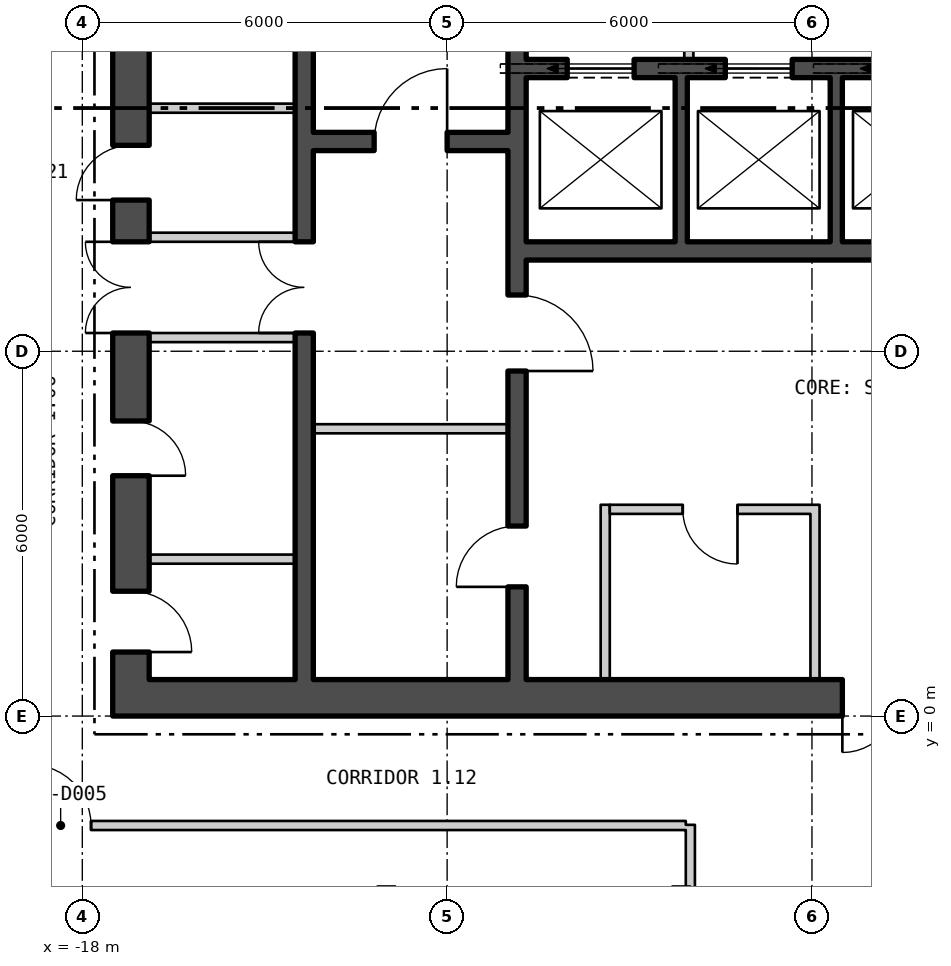
"""IFC4 building model, lengths in metres.
Left out: names, types, materials, properties, quantities, classifications, styles, units other than length and angle.
Written with IfcOpenShell. Run it as: python <this file> out.ifc"""

import sys

from ifc_helpers import new_model, si_unit, direction, frame, frame_2d, origin, origin_2d, place, context, subcontext, project, spatial, polyline, rectangle, i_section, outline, extrude, element, fill, save


model = new_model("IFC4")
c1 = context("Model", 3, precision=1e-05, world=origin(), true_north=direction((0.0, 1.0)))
c2 = subcontext(c1, "Body", "Model", "MODEL_VIEW")
j1 = project(units=[si_unit("LENGTHUNIT", "METRE"), si_unit("PLANEANGLEUNIT", "RADIAN")], contexts=[c1])
p1 = place(None, origin())
s1 = spatial("IfcSite", under=j1, at=p1, CompositionType="ELEMENT")
p2 = place(p1, origin())
s2 = spatial("IfcBuilding", under=s1, at=p2, CompositionType="ELEMENT")
p3 = place(p2, frame((0.0, 0.0, 28.8)))
s3 = spatial("IfcBuildingStorey", under=s2, at=p3, CompositionType="ELEMENT", Elevation=28.8)
for number, where, z_axis, x_axis in (
    (1, (-8.15, -3.2, 0.0), (0.0, 0.0, 1.0), (1.0, 0.0, 0.0)),
    (2, (-13.0, -3.2, 0.0), (0.0, 0.0, 1.0), (1.0, 0.0, 0.0)),
):
    element("IfcColumn", number, at=place(p3, frame(where, z_axis=z_axis, x_axis=x_axis)), inside=s3, PredefinedType="COLUMN", context=c2, shape_type="SweptSolid", body=[
        extrude(i_section(OverallWidth=0.303, OverallDepth=0.814, WebThickness=0.021, FlangeThickness=0.04, at=origin_2d()), origin(), (0.0, 0.0, 1.0), 4.5),
    ])
p4 = place(p3, frame((-28.74, 9.808, -0.23), z_axis=(0.0, 0.0, 1.0), x_axis=(0.499999764979, -0.866025539474, 0.0)))
e3 = element("IfcWall", 3, at=p4, inside=s3, PredefinedType="SOLIDWALL", context=c2, shape_type="SweptSolid", body=[
    extrude(outline(polyline([(-0.13, -0.225), (45.87, -0.225), (45.61, 0.225), (0.13, 0.225), (-0.13, -0.225)])), origin(), (0.0, 0.0, 1.0), 4.55),
])
p5 = place(p4, frame((1.724, 0.0, 0.23)))
e4 = element("IfcOpeningElement", 4, at=p5, cuts=e3, PredefinedType="OPENING", context=c2, shape_type="SweptSolid", body=[
    extrude(rectangle(XDim=1.8, YDim=2.4, at=frame_2d((0.9, 1.2))), frame((0.0, 0.235, 0.0), z_axis=(0.0, -1.0, 0.0), x_axis=(1.0, 0.0, 0.0)), (0.0, 0.0, 1.0), 0.47),
])
p6 = place(p4, frame((5.893, 0.0, 1.13)))
e5 = element("IfcOpeningElement", 5, at=p6, cuts=e3, PredefinedType="OPENING", context=c2, shape_type="SweptSolid", body=[
    extrude(rectangle(XDim=2.4, YDim=2.6, at=frame_2d((1.2, 1.3))), frame((0.0, 0.235, 0.0), z_axis=(0.0, -1.0, 0.0), x_axis=(1.0, 0.0, 0.0)), (0.0, 0.0, 1.0), 0.47),
])
p7 = place(p4, frame((10.401, 0.0, 1.13)))
e6 = element("IfcOpeningElement", 6, at=p7, cuts=e3, PredefinedType="OPENING", context=c2, shape_type="SweptSolid", body=[
    extrude(rectangle(XDim=2.4, YDim=2.6, at=frame_2d((1.2, 1.3))), frame((0.0, 0.235, 0.0), z_axis=(0.0, -1.0, 0.0), x_axis=(1.0, 0.0, 0.0)), (0.0, 0.0, 1.0), 0.47),
])
p8 = place(p4, frame((14.909, 0.0, 1.13)))
e7 = element("IfcOpeningElement", 7, at=p8, cuts=e3, PredefinedType="OPENING", context=c2, shape_type="SweptSolid", body=[
    extrude(rectangle(XDim=2.4, YDim=2.6, at=frame_2d((1.2, 1.3))), frame((0.0, 0.235, 0.0), z_axis=(0.0, -1.0, 0.0), x_axis=(1.0, 0.0, 0.0)), (0.0, 0.0, 1.0), 0.47),
])
p9 = place(p4, frame((19.416, 0.0, 1.13)))
e8 = element("IfcOpeningElement", 8, at=p9, cuts=e3, PredefinedType="OPENING", context=c2, shape_type="SweptSolid", body=[
    extrude(rectangle(XDim=2.4, YDim=2.6, at=frame_2d((1.2, 1.3))), frame((0.0, 0.235, 0.0), z_axis=(0.0, -1.0, 0.0), x_axis=(1.0, 0.0, 0.0)), (0.0, 0.0, 1.0), 0.47),
])
p10 = place(p4, frame((23.924, 0.0, 1.13)))
e9 = element("IfcOpeningElement", 9, at=p10, cuts=e3, PredefinedType="OPENING", context=c2, shape_type="SweptSolid", body=[
    extrude(rectangle(XDim=2.4, YDim=2.6, at=frame_2d((1.2, 1.3))), frame((0.0, 0.235, 0.0), z_axis=(0.0, -1.0, 0.0), x_axis=(1.0, 0.0, 0.0)), (0.0, 0.0, 1.0), 0.47),
])
p11 = place(p4, frame((28.431, 0.0, 1.13)))
e10 = element("IfcOpeningElement", 10, at=p11, cuts=e3, PredefinedType="OPENING", context=c2, shape_type="SweptSolid", body=[
    extrude(rectangle(XDim=2.4, YDim=2.6, at=frame_2d((1.2, 1.3))), frame((0.0, 0.235, 0.0), z_axis=(0.0, -1.0, 0.0), x_axis=(1.0, 0.0, 0.0)), (0.0, 0.0, 1.0), 0.47),
])
p12 = place(p4, frame((33.239, 0.0, 0.23)))
e11 = element("IfcOpeningElement", 11, at=p12, cuts=e3, PredefinedType="OPENING", context=c2, shape_type="SweptSolid", body=[
    extrude(rectangle(XDim=1.8, YDim=2.4, at=frame_2d((0.9, 1.2))), frame((0.0, 0.235, 0.0), z_axis=(0.0, -1.0, 0.0), x_axis=(1.0, 0.0, 0.0)), (0.0, 0.0, 1.0), 0.47),
])
p13 = place(p4, frame((37.447, 0.0, 1.13)))
e12 = element("IfcOpeningElement", 12, at=p13, cuts=e3, PredefinedType="OPENING", context=c2, shape_type="SweptSolid", body=[
    extrude(rectangle(XDim=2.4, YDim=2.6, at=frame_2d((1.2, 1.3))), frame((0.0, 0.235, 0.0), z_axis=(0.0, -1.0, 0.0), x_axis=(1.0, 0.0, 0.0)), (0.0, 0.0, 1.0), 0.47),
])
p14 = place(p4, frame((41.916, 0.0, 1.13)))
e13 = element("IfcOpeningElement", 13, at=p14, cuts=e3, PredefinedType="OPENING", context=c2, shape_type="SweptSolid", body=[
    extrude(rectangle(XDim=2.4, YDim=2.6, at=frame_2d((1.2, 1.3))), frame((0.0, 0.235, 0.0), z_axis=(0.0, -1.0, 0.0), x_axis=(1.0, 0.0, 0.0)), (0.0, 0.0, 1.0), 0.47),
])
p15 = place(p3, frame((-17.5, 0.3, 0.0), z_axis=(0.0, 0.0, 1.0), x_axis=(1.0, 0.0, 0.0)))
e14 = element("IfcWall", 14, at=p15, inside=s3, PredefinedType="SHEAR", context=c2, shape_type="SweptSolid", body=[
    extrude(rectangle(XDim=35.0, YDim=0.6, at=frame_2d((17.5, 0.0))), origin(), (0.0, 0.0, 1.0), 4.3),
])
p16 = place(p15, frame((12.0, 0.0, 0.0)))
e15 = element("IfcOpeningElement", 15, at=p16, cuts=e14, PredefinedType="OPENING", context=c2, shape_type="SweptSolid", body=[
    extrude(rectangle(XDim=1.8, YDim=2.4, at=frame_2d((0.9, 1.2))), frame((0.0, 0.31, 0.0), z_axis=(0.0, -1.0, 0.0), x_axis=(1.0, 0.0, 0.0)), (0.0, 0.0, 1.0), 0.62),
])
p17 = place(p15, frame((22.0, 0.0, 0.0)))
e16 = element("IfcOpeningElement", 16, at=p17, cuts=e14, PredefinedType="OPENING", context=c2, shape_type="SweptSolid", body=[
    extrude(rectangle(XDim=1.8, YDim=2.4, at=frame_2d((0.9, 1.2))), frame((0.0, 0.31, 0.0), z_axis=(0.0, -1.0, 0.0), x_axis=(1.0, 0.0, 0.0)), (0.0, 0.0, 1.0), 0.62),
])
p18 = place(p3, frame((-17.2, 0.6, 0.0), z_axis=(0.0, 0.0, 1.0), x_axis=(0.0, 1.0, 0.0)))
e17 = element("IfcWall", 17, at=p18, inside=s3, PredefinedType="SHEAR", context=c2, shape_type="SweptSolid", body=[
    extrude(rectangle(XDim=16.8, YDim=0.6, at=frame_2d((8.4, 0.0))), origin(), (0.0, 0.0, 1.0), 4.3),
])
p19 = place(p18, frame((5.7, 0.0, 0.0)))
e18 = element("IfcOpeningElement", 18, at=p19, cuts=e17, PredefinedType="OPENING", context=c2, shape_type="SweptSolid", body=[
    extrude(rectangle(XDim=1.5, YDim=2.1, at=frame_2d((0.75, 1.05))), frame((0.0, 0.31, 0.0), z_axis=(0.0, -1.0, 0.0), x_axis=(1.0, 0.0, 0.0)), (0.0, 0.0, 1.0), 0.62),
])
p20 = place(p18, frame((0.453, 0.0, 0.0)))
e19 = element("IfcOpeningElement", 19, at=p20, cuts=e17, PredefinedType="OPENING", context=c2, shape_type="SweptSolid", body=[
    extrude(rectangle(XDim=1.0, YDim=2.1, at=frame_2d((0.5, 1.05))), frame((0.0, 0.31, 0.0), z_axis=(0.0, -1.0, 0.0), x_axis=(1.0, 0.0, 0.0)), (0.0, 0.0, 1.0), 0.62),
])
p21 = place(p18, frame((3.353, 0.0, 0.0)))
e20 = element("IfcOpeningElement", 20, at=p21, cuts=e17, PredefinedType="OPENING", context=c2, shape_type="SweptSolid", body=[
    extrude(rectangle(XDim=0.9, YDim=2.1, at=frame_2d((0.45, 1.05))), frame((0.0, 0.31, 0.0), z_axis=(0.0, -1.0, 0.0), x_axis=(1.0, 0.0, 0.0)), (0.0, 0.0, 1.0), 0.62),
])
p22 = place(p18, frame((7.886, 0.0, 0.0)))
e21 = element("IfcOpeningElement", 21, at=p22, cuts=e17, PredefinedType="OPENING", context=c2, shape_type="SweptSolid", body=[
    extrude(rectangle(XDim=0.9, YDim=2.1, at=frame_2d((0.45, 1.05))), frame((0.0, 0.31, 0.0), z_axis=(0.0, -1.0, 0.0), x_axis=(1.0, 0.0, 0.0)), (0.0, 0.0, 1.0), 0.62),
])
p23 = place(p18, frame((12.686, 0.0, 0.0)))
e22 = element("IfcOpeningElement", 22, at=p23, cuts=e17, PredefinedType="OPENING", context=c2, shape_type="SweptSolid", body=[
    extrude(rectangle(XDim=0.9, YDim=2.1, at=frame_2d((0.45, 1.05))), frame((0.0, 0.31, 0.0), z_axis=(0.0, -1.0, 0.0), x_axis=(1.0, 0.0, 0.0)), (0.0, 0.0, 1.0), 0.62),
])
p24 = place(p3, frame((-10.85, 0.6, 0.0), z_axis=(0.0, 0.0, 1.0), x_axis=(0.0, 1.0, 0.0)))
e23 = element("IfcWall", 23, at=p24, inside=s3, PredefinedType="SHEAR", context=c2, shape_type="SweptSolid", body=[
    extrude(rectangle(XDim=16.8, YDim=0.3, at=frame_2d((8.4, 0.0))), origin(), (0.0, 0.0, 1.0), 4.3),
])
p25 = place(p24, frame((5.075, 0.0, 0.0)))
e24 = element("IfcOpeningElement", 24, at=p25, cuts=e23, PredefinedType="OPENING", context=c2, shape_type="SweptSolid", body=[
    extrude(rectangle(XDim=1.25, YDim=2.1, at=frame_2d((0.625, 1.05))), frame((0.0, 0.16, 0.0), z_axis=(0.0, -1.0, 0.0), x_axis=(1.0, 0.0, 0.0)), (0.0, 0.0, 1.0), 0.32),
])
p26 = place(p24, frame((1.525, 0.0, 0.0)))
e25 = element("IfcOpeningElement", 25, at=p26, cuts=e23, PredefinedType="OPENING", context=c2, shape_type="SweptSolid", body=[
    extrude(rectangle(XDim=1.0, YDim=2.1, at=frame_2d((0.5, 1.05))), frame((0.0, 0.16, 0.0), z_axis=(0.0, -1.0, 0.0), x_axis=(1.0, 0.0, 0.0)), (0.0, 0.0, 1.0), 0.32),
])
p27 = place(p3, frame((-14.35, 0.6, 0.0), z_axis=(0.0, 0.0, 1.0), x_axis=(0.0, 1.0, 0.0)))
e26 = element("IfcWall", 26, at=p27, inside=s3, PredefinedType="SHEAR", context=c2, shape_type="SweptSolid", body=[
    extrude(rectangle(XDim=16.8, YDim=0.3, at=frame_2d((8.4, 0.0))), origin(), (0.0, 0.0, 1.0), 4.3),
])
p28 = place(p27, frame((5.7, 0.0, 0.0)))
e27 = element("IfcOpeningElement", 27, at=p28, cuts=e26, PredefinedType="OPENING", context=c2, shape_type="SweptSolid", body=[
    extrude(rectangle(XDim=1.5, YDim=2.1, at=frame_2d((0.75, 1.05))), frame((0.0, 0.16, 0.0), z_axis=(0.0, -1.0, 0.0), x_axis=(1.0, 0.0, 0.0)), (0.0, 0.0, 1.0), 0.32),
])
p29 = place(p3, frame((-14.2, 9.45, 0.0), z_axis=(0.0, 0.0, 1.0), x_axis=(1.0, 0.0, 0.0)))
e28 = element("IfcWall", 28, at=p29, inside=s3, PredefinedType="SHEAR", context=c2, shape_type="SweptSolid", body=[
    extrude(rectangle(XDim=3.2, YDim=0.3, at=frame_2d((1.6, 0.0))), origin(), (0.0, 0.0, 1.0), 4.3),
])
p30 = place(p29, frame((1.0, 0.0, 0.0)))
e29 = element("IfcOpeningElement", 29, at=p30, cuts=e28, PredefinedType="OPENING", context=c2, shape_type="SweptSolid", body=[
    extrude(rectangle(XDim=1.2, YDim=2.1, at=frame_2d((0.6, 1.05))), frame((0.0, 0.16, 0.0), z_axis=(0.0, -1.0, 0.0), x_axis=(1.0, 0.0, 0.0)), (0.0, 0.0, 1.0), 0.32),
])
p31 = place(p3, frame((-10.7, 10.65, 0.0), z_axis=(0.0, 0.0, 1.0), x_axis=(1.0, 0.0, 0.0)))
e30 = element("IfcWall", 30, at=p31, inside=s3, PredefinedType="SHEAR", context=c2, shape_type="SweptSolid", body=[
    extrude(rectangle(XDim=10.3, YDim=0.3, at=frame_2d((5.15, 0.0))), origin(), (0.0, 0.0, 1.0), 4.3),
])
p32 = place(p31, frame((0.675, 0.0, 0.0)))
e31 = element("IfcOpeningElement", 31, at=p32, cuts=e30, PredefinedType="OPENING", context=c2, shape_type="SweptSolid", body=[
    extrude(rectangle(XDim=1.1, YDim=2.1, at=frame_2d((0.55, 1.05))), frame((0.0, 0.16, 0.0), z_axis=(0.0, -1.0, 0.0), x_axis=(1.0, 0.0, 0.0)), (0.0, 0.0, 1.0), 0.32),
])
p33 = place(p31, frame((3.275, 0.0, 0.0)))
e32 = element("IfcOpeningElement", 32, at=p33, cuts=e30, PredefinedType="OPENING", context=c2, shape_type="SweptSolid", body=[
    extrude(rectangle(XDim=1.1, YDim=2.1, at=frame_2d((0.55, 1.05))), frame((0.0, 0.16, 0.0), z_axis=(0.0, -1.0, 0.0), x_axis=(1.0, 0.0, 0.0)), (0.0, 0.0, 1.0), 0.32),
])
p34 = place(p31, frame((5.825, 0.0, 0.0)))
e33 = element("IfcOpeningElement", 33, at=p34, cuts=e30, PredefinedType="OPENING", context=c2, shape_type="SweptSolid", body=[
    extrude(rectangle(XDim=1.1, YDim=2.1, at=frame_2d((0.55, 1.05))), frame((0.0, 0.16, 0.0), z_axis=(0.0, -1.0, 0.0), x_axis=(1.0, 0.0, 0.0)), (0.0, 0.0, 1.0), 0.32),
])
p35 = place(p31, frame((8.375, 0.0, 0.0)))
e34 = element("IfcOpeningElement", 34, at=p35, cuts=e30, PredefinedType="OPENING", context=c2, shape_type="SweptSolid", body=[
    extrude(rectangle(XDim=1.1, YDim=2.1, at=frame_2d((0.55, 1.05))), frame((0.0, 0.16, 0.0), z_axis=(0.0, -1.0, 0.0), x_axis=(1.0, 0.0, 0.0)), (0.0, 0.0, 1.0), 0.32),
])
p36 = place(p3, frame((-10.7, 7.65, 0.0), z_axis=(0.0, 0.0, 1.0), x_axis=(1.0, 0.0, 0.0)))
e35 = element("IfcWall", 35, at=p36, inside=s3, PredefinedType="SHEAR", context=c2, shape_type="SweptSolid", body=[
    extrude(rectangle(XDim=10.3, YDim=0.3, at=frame_2d((5.15, 0.0))), origin(), (0.0, 0.0, 1.0), 4.3),
])
for number, where, z_axis, x_axis in (
    (36, (-8.15, 7.8, 0.0), (0.0, 0.0, 1.0), (0.0, 1.0, 0.0)),
    (37, (-5.6, 7.8, 0.0), (0.0, 0.0, 1.0), (0.0, 1.0, 0.0)),
):
    element("IfcWall", number, at=place(p3, frame(where, z_axis=z_axis, x_axis=x_axis)), inside=s3, PredefinedType="SHEAR", context=c2, shape_type="SweptSolid", body=[
        extrude(rectangle(XDim=2.7, YDim=0.2, at=frame_2d((1.35, 0.0))), origin(), (0.0, 0.0, 1.0), 4.3),
    ])
p37 = place(p3, frame((-8.025, 10.8, 0.0), z_axis=(0.0, 0.0, 1.0), x_axis=(0.0, 1.0, 0.0)))
e38 = element("IfcWall", 38, at=p37, inside=s3, PredefinedType="PARTITIONING", context=c2, shape_type="SweptSolid", body=[
    extrude(rectangle(XDim=3.6, YDim=0.15, at=frame_2d((1.8, 0.0))), origin(), (0.0, 0.0, 1.0), 4.3),
])
p38 = place(p37, frame((1.175, 0.0, 0.0)))
e39 = element("IfcOpeningElement", 39, at=p38, cuts=e38, PredefinedType="OPENING", context=c2, shape_type="SweptSolid", body=[
    extrude(rectangle(XDim=1.25, YDim=2.1, at=frame_2d((0.625, 1.05))), frame((0.0, 0.085, 0.0), z_axis=(0.0, -1.0, 0.0), x_axis=(1.0, 0.0, 0.0)), (0.0, 0.0, 1.0), 0.17),
])
p39 = place(p3, frame((-14.2, 4.725, 0.0), z_axis=(0.0, 0.0, 1.0), x_axis=(1.0, 0.0, 0.0)))
e40 = element("IfcWall", 40, at=p39, inside=s3, PredefinedType="PARTITIONING", context=c2, shape_type="SweptSolid", body=[
    extrude(rectangle(XDim=3.2, YDim=0.15, at=frame_2d((1.6, 0.0))), origin(), (0.0, 0.0, 1.0), 4.3),
])
for number, where, z_axis, x_axis in (
    (41, (-16.9, 6.225, 0.0), (0.0, 0.0, 1.0), (1.0, 0.0, 0.0)),
    (42, (-16.9, 7.875, 0.0), (0.0, 0.0, 1.0), (1.0, 0.0, 0.0)),
    (43, (-16.9, 2.581, 0.0), (0.0, 0.0, 1.0), (1.0, 0.0, 0.0)),
    (44, (-16.9, 9.998, 0.0), (0.0, 0.0, 1.0), (1.0, 0.0, 0.0)),
):
    element("IfcWall", number, at=place(p3, frame(where, z_axis=z_axis, x_axis=x_axis)), inside=s3, PredefinedType="PARTITIONING", context=c2, shape_type="SweptSolid", body=[
        extrude(rectangle(XDim=2.4, YDim=0.15, at=frame_2d((1.2, 0.0))), origin(), (0.0, 0.0, 1.0), 4.3),
    ])
for number, where, z_axis, x_axis in (
    (45, (-9.4, 0.6, 0.0), (0.0, 0.0, 1.0), (0.0, 1.0, 0.0)),
    (46, (-5.95, 0.6, 0.0), (0.0, 0.0, 1.0), (0.0, 1.0, 0.0)),
):
    element("IfcWall", number, at=place(p3, frame(where, z_axis=z_axis, x_axis=x_axis)), inside=s3, PredefinedType="PARTITIONING", context=c2, shape_type="SweptSolid", body=[
        extrude(rectangle(XDim=2.875, YDim=0.15, at=frame_2d((1.438, 0.0))), origin(), (0.0, 0.0, 1.0), 4.3),
    ])
p40 = place(p3, frame((-9.325, 3.4, 0.0), z_axis=(0.0, 0.0, 1.0), x_axis=(1.0, 0.0, 0.0)))
e47 = element("IfcWall", 47, at=p40, inside=s3, PredefinedType="PARTITIONING", context=c2, shape_type="SweptSolid", body=[
    extrude(rectangle(XDim=3.3, YDim=0.15, at=frame_2d((1.65, 0.0))), origin(), (0.0, 0.0, 1.0), 4.3),
])
p41 = place(p40, frame((1.2, 0.0, 0.0)))
e48 = element("IfcOpeningElement", 48, at=p41, cuts=e47, PredefinedType="OPENING", context=c2, shape_type="SweptSolid", body=[
    extrude(rectangle(XDim=0.9, YDim=2.1, at=frame_2d((0.45, 1.05))), frame((0.0, 0.085, 0.0), z_axis=(0.0, -1.0, 0.0), x_axis=(1.0, 0.0, 0.0)), (0.0, 0.0, 1.0), 0.17),
])
p42 = place(p3, frame((-19.225, -1.8, 0.0), z_axis=(0.0, 0.0, 1.0), x_axis=(1.0, 0.0, 0.0)))
e49 = element("IfcWall", 49, at=p42, inside=s3, PredefinedType="PARTITIONING", context=c2, shape_type="SweptSolid", body=[
    extrude(rectangle(XDim=11.15, YDim=0.15, at=frame_2d((5.575, 0.0))), origin(), (0.0, 0.0, 1.0), 4.3),
])
p43 = place(p42, frame((0.369, 0.0, 0.0)))
e50 = element("IfcOpeningElement", 50, at=p43, cuts=e49, PredefinedType="OPENING", context=c2, shape_type="SweptSolid", body=[
    extrude(rectangle(XDim=1.0, YDim=2.1, at=frame_2d((0.5, 1.05))), frame((0.0, 0.085, 0.0), z_axis=(0.0, -1.0, 0.0), x_axis=(1.0, 0.0, 0.0)), (0.0, 0.0, 1.0), 0.17),
])
p44 = place(p3, frame((-8.0, -3.2, 0.0), z_axis=(0.0, 0.0, 1.0), x_axis=(0.0, 1.0, 0.0)))
e51 = element("IfcWall", 51, at=p44, inside=s3, PredefinedType="PARTITIONING", context=c2, shape_type="SweptSolid", body=[
    extrude(rectangle(XDim=1.411, YDim=0.15, at=frame_2d((0.706, 0.0))), origin(), (0.0, 0.0, 1.0), 4.3),
])
p45 = place(p32, origin())
e52 = element("IfcDoor", 52, at=p45, inside=s3, OperationType="SLIDING_TO_LEFT", PredefinedType="DOOR", context=c2, shape_type="SweptSolid", body=[
    extrude(rectangle(XDim=1.1, YDim=2.1, at=frame_2d((0.55, 1.05))), frame((0.0, 0.025, 0.0), z_axis=(0.0, -1.0, 0.0), x_axis=(1.0, 0.0, 0.0)), (0.0, 0.0, 1.0), 0.05),
])
fill(e31, e52)
p46 = place(p33, origin())
e53 = element("IfcDoor", 53, at=p46, inside=s3, OperationType="SLIDING_TO_LEFT", PredefinedType="DOOR", context=c2, shape_type="SweptSolid", body=[
    extrude(rectangle(XDim=1.1, YDim=2.1, at=frame_2d((0.55, 1.05))), frame((0.0, 0.025, 0.0), z_axis=(0.0, -1.0, 0.0), x_axis=(1.0, 0.0, 0.0)), (0.0, 0.0, 1.0), 0.05),
])
fill(e32, e53)
p47 = place(p30, origin())
e54 = element("IfcDoor", 54, at=p47, inside=s3, OperationType="SINGLE_SWING_LEFT", PredefinedType="DOOR", context=c2, shape_type="SweptSolid", body=[
    extrude(rectangle(XDim=1.2, YDim=2.1, at=frame_2d((0.6, 1.05))), frame((0.0, 0.025, 0.0), z_axis=(0.0, -1.0, 0.0), x_axis=(1.0, 0.0, 0.0)), (0.0, 0.0, 1.0), 0.05),
])
fill(e29, e54)
p48 = place(p25, origin())
e55 = element("IfcDoor", 55, at=p48, inside=s3, OperationType="SINGLE_SWING_LEFT", PredefinedType="DOOR", context=c2, shape_type="SweptSolid", body=[
    extrude(rectangle(XDim=1.25, YDim=2.1, at=frame_2d((0.625, 1.05))), frame((0.0, 0.025, 0.0), z_axis=(0.0, -1.0, 0.0), x_axis=(1.0, 0.0, 0.0)), (0.0, 0.0, 1.0), 0.05),
])
fill(e24, e55)
p49 = place(p26, origin())
e56 = element("IfcDoor", 56, at=p49, inside=s3, OperationType="SINGLE_SWING_RIGHT", PredefinedType="DOOR", context=c2, shape_type="SweptSolid", body=[
    extrude(rectangle(XDim=1.0, YDim=2.1, at=frame_2d((0.5, 1.05))), frame((0.0, 0.025, 0.0), z_axis=(0.0, -1.0, 0.0), x_axis=(1.0, 0.0, 0.0)), (0.0, 0.0, 1.0), 0.05),
])
fill(e25, e56)
p50 = place(p28, origin())
e57 = element("IfcDoor", 57, at=p50, inside=s3, OperationType="DOUBLE_DOOR_SINGLE_SWING", PredefinedType="DOOR", context=c2, shape_type="SweptSolid", body=[
    extrude(rectangle(XDim=1.5, YDim=2.1, at=frame_2d((0.75, 1.05))), frame((0.0, 0.025, 0.0), z_axis=(0.0, -1.0, 0.0), x_axis=(1.0, 0.0, 0.0)), (0.0, 0.0, 1.0), 0.05),
])
fill(e27, e57)
p51 = place(p19, origin())
e58 = element("IfcDoor", 58, at=p51, inside=s3, OperationType="DOUBLE_DOOR_SINGLE_SWING", PredefinedType="DOOR", context=c2, shape_type="SweptSolid", body=[
    extrude(rectangle(XDim=1.5, YDim=2.1, at=frame_2d((0.75, 1.05))), frame((0.0, 0.025, 0.0), z_axis=(0.0, -1.0, 0.0), x_axis=(1.0, 0.0, 0.0)), (0.0, 0.0, 1.0), 0.05),
])
fill(e18, e58)
p52 = place(p20, origin())
e59 = element("IfcDoor", 59, at=p52, inside=s3, OperationType="SINGLE_SWING_LEFT", PredefinedType="DOOR", context=c2, shape_type="SweptSolid", body=[
    extrude(rectangle(XDim=1.0, YDim=2.1, at=frame_2d((0.5, 1.05))), frame((0.0, 0.025, 0.0), z_axis=(0.0, -1.0, 0.0), x_axis=(1.0, 0.0, 0.0)), (0.0, 0.0, 1.0), 0.05),
])
fill(e19, e59)
p53 = place(p21, origin())
e60 = element("IfcDoor", 60, at=p53, inside=s3, OperationType="SINGLE_SWING_LEFT", PredefinedType="DOOR", context=c2, shape_type="SweptSolid", body=[
    extrude(rectangle(XDim=0.9, YDim=2.1, at=frame_2d((0.45, 1.05))), frame((0.0, 0.025, 0.0), z_axis=(0.0, -1.0, 0.0), x_axis=(1.0, 0.0, 0.0)), (0.0, 0.0, 1.0), 0.05),
])
fill(e20, e60)
p54 = place(p22, origin())
e61 = element("IfcDoor", 61, at=p54, inside=s3, OperationType="SINGLE_SWING_RIGHT", PredefinedType="DOOR", context=c2, shape_type="SweptSolid", body=[
    extrude(rectangle(XDim=0.9, YDim=2.1, at=frame_2d((0.45, 1.05))), frame((0.0, 0.025, 0.0), z_axis=(0.0, -1.0, 0.0), x_axis=(1.0, 0.0, 0.0)), (0.0, 0.0, 1.0), 0.05),
])
fill(e21, e61)
p55 = place(p41, origin())
e62 = element("IfcDoor", 62, at=p55, inside=s3, OperationType="SINGLE_SWING_RIGHT", PredefinedType="DOOR", context=c2, shape_type="SweptSolid", body=[
    extrude(rectangle(XDim=0.9, YDim=2.1, at=frame_2d((0.45, 1.05))), frame((0.0, 0.025, 0.0), z_axis=(0.0, -1.0, 0.0), x_axis=(1.0, 0.0, 0.0)), (0.0, 0.0, 1.0), 0.05),
])
fill(e48, e62)
p56 = place(p16, origin())
e63 = element("IfcDoor", 63, at=p56, inside=s3, OperationType="DOUBLE_DOOR_SINGLE_SWING", PredefinedType="DOOR", context=c2, shape_type="SweptSolid", body=[
    extrude(rectangle(XDim=1.8, YDim=2.4, at=frame_2d((0.9, 1.2))), frame((0.0, 0.025, 0.0), z_axis=(0.0, -1.0, 0.0), x_axis=(1.0, 0.0, 0.0)), (0.0, 0.0, 1.0), 0.05),
])
fill(e15, e63)
p57 = place(p43, origin())
e64 = element("IfcDoor", 64, at=p57, inside=s3, OperationType="SINGLE_SWING_RIGHT", PredefinedType="DOOR", context=c2, shape_type="SweptSolid", body=[
    extrude(rectangle(XDim=1.0, YDim=2.1, at=frame_2d((0.5, 1.05))), frame((0.0, 0.025, 0.0), z_axis=(0.0, -1.0, 0.0), x_axis=(1.0, 0.0, 0.0)), (0.0, 0.0, 1.0), 0.05),
])
fill(e50, e64)
save(model, sys.argv[1])
